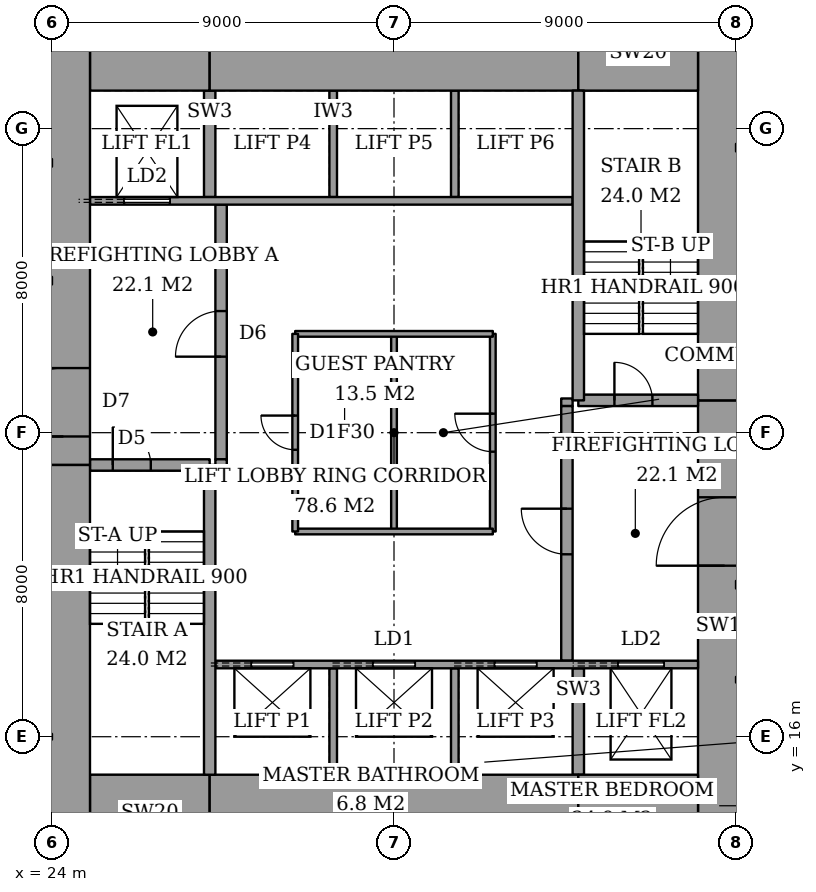
"""IFC4 building model, lengths in metres.
Left out: names, types, materials, properties, quantities, classifications, styles, units other than length and angle.
Written with IfcOpenShell. Run it as: python <this file> out.ifc"""

import sys

from ifc_helpers import new_model, si_unit, direction, frame, frame_2d, origin, place, context, subcontext, project, spatial, rectangle, extrude, element, fill, save


model = new_model("IFC4")
c1 = context("Model", 3, precision=1e-05, world=origin(), true_north=direction((0.0, 1.0)))
c2 = subcontext(c1, "Body", "Model", "MODEL_VIEW")
j1 = project(units=[si_unit("LENGTHUNIT", "METRE"), si_unit("PLANEANGLEUNIT", "RADIAN")], contexts=[c1])
p1 = place(None, origin())
s1 = spatial("IfcSite", under=j1, at=p1, CompositionType="ELEMENT")
p2 = place(p1, origin())
s2 = spatial("IfcBuilding", under=s1, at=p2, CompositionType="ELEMENT")
p3 = place(p2, frame((0.0, 0.0, 54.8)))
s3 = spatial("IfcBuildingStorey", under=s2, at=p3, CompositionType="ELEMENT", Elevation=54.8)
p4 = place(p3, frame((25.0, 14.0, 0.0), z_axis=(0.0, 0.0, 1.0), x_axis=(1.0, 0.0, 0.0)))
e1 = element("IfcWall", 1, at=p4, inside=s3, PredefinedType="SHEAR", context=c2, shape_type="SweptSolid", body=[
    extrude(rectangle(XDim=3.15, YDim=2.0, at=frame_2d((1.575, 0.0))), origin(), (0.0, 0.0, 1.0), 3.6),
])
p5 = place(p3, frame((28.15, 14.0, 0.0), z_axis=(0.0, 0.0, 1.0), x_axis=(1.0, 0.0, 0.0)))
e2 = element("IfcWall", 2, at=p5, inside=s3, PredefinedType="SHEAR", context=c2, shape_type="SweptSolid", body=[
    extrude(rectangle(XDim=9.7, YDim=2.0, at=frame_2d((4.85, 0.0))), origin(), (0.0, 0.0, 1.0), 3.6),
])
for number, where, z_axis, x_axis in (
    (3, (37.85, 14.0, 0.0), (0.0, 0.0, 1.0), (1.0, 0.0, 0.0)),
    (4, (25.0, 34.0, 0.0), (0.0, 0.0, 1.0), (1.0, 0.0, 0.0)),
):
    element("IfcWall", number, at=place(p3, frame(where, z_axis=z_axis, x_axis=x_axis)), inside=s3, PredefinedType="SHEAR", context=c2, shape_type="SweptSolid", body=[
        extrude(rectangle(XDim=3.15, YDim=2.0, at=frame_2d((1.575, 0.0))), origin(), (0.0, 0.0, 1.0), 3.6),
    ])
p6 = place(p3, frame((28.15, 34.0, 0.0), z_axis=(0.0, 0.0, 1.0), x_axis=(1.0, 0.0, 0.0)))
e5 = element("IfcWall", 5, at=p6, inside=s3, PredefinedType="SHEAR", context=c2, shape_type="SweptSolid", body=[
    extrude(rectangle(XDim=9.7, YDim=2.0, at=frame_2d((4.85, 0.0))), origin(), (0.0, 0.0, 1.0), 3.6),
])
p7 = place(p3, frame((37.85, 34.0, 0.0), z_axis=(0.0, 0.0, 1.0), x_axis=(1.0, 0.0, 0.0)))
e6 = element("IfcWall", 6, at=p7, inside=s3, PredefinedType="SHEAR", context=c2, shape_type="SweptSolid", body=[
    extrude(rectangle(XDim=3.15, YDim=2.0, at=frame_2d((1.575, 0.0))), origin(), (0.0, 0.0, 1.0), 3.6),
])
p8 = place(p3, frame((24.3, 13.0, 0.0), z_axis=(0.0, 0.0, 1.0), x_axis=(0.0, 1.0, 0.0)))
e7 = element("IfcWall", 7, at=p8, inside=s3, PredefinedType="SHEAR", context=c2, shape_type="SweptSolid", body=[
    extrude(rectangle(XDim=10.15, YDim=1.4, at=frame_2d((5.075, 0.0))), origin(), (0.0, 0.0, 1.0), 3.6),
])
p9 = place(p3, frame((24.3, 23.15, 0.0), z_axis=(0.0, 0.0, 1.0), x_axis=(0.0, 1.0, 0.0)))
e8 = element("IfcWall", 8, at=p9, inside=s3, PredefinedType="SHEAR", context=c2, shape_type="SweptSolid", body=[
    extrude(rectangle(XDim=11.85, YDim=1.4, at=frame_2d((5.925, 0.0))), origin(), (0.0, 0.0, 1.0), 3.6),
])
p10 = place(p9, frame((0.75, 0.0, 0.0)))
e9 = element("IfcOpeningElement", 9, at=p10, cuts=e8, PredefinedType="OPENING", context=c2, shape_type="SweptSolid", body=[
    extrude(rectangle(XDim=1.8, YDim=2.4, at=frame_2d((0.9, 1.2))), frame((0.0, 0.71, 0.0), z_axis=(0.0, -1.0, 0.0), x_axis=(1.0, 0.0, 0.0)), (0.0, 0.0, 1.0), 1.42),
])
p11 = place(p3, frame((41.7, 13.0, 0.0), z_axis=(0.0, 0.0, 1.0), x_axis=(0.0, 1.0, 0.0)))
e10 = element("IfcWall", 10, at=p11, inside=s3, PredefinedType="SHEAR", context=c2, shape_type="SweptSolid", body=[
    extrude(rectangle(XDim=11.85, YDim=1.4, at=frame_2d((5.925, 0.0))), origin(), (0.0, 0.0, 1.0), 3.6),
])
p12 = place(p11, frame((7.5, 0.0, 0.0)))
e11 = element("IfcOpeningElement", 11, at=p12, cuts=e10, PredefinedType="OPENING", context=c2, shape_type="SweptSolid", body=[
    extrude(rectangle(XDim=1.8, YDim=2.4, at=frame_2d((0.9, 1.2))), frame((0.0, 0.71, 0.0), z_axis=(0.0, -1.0, 0.0), x_axis=(1.0, 0.0, 0.0)), (0.0, 0.0, 1.0), 1.42),
])
p13 = place(p3, frame((41.7, 24.85, 0.0), z_axis=(0.0, 0.0, 1.0), x_axis=(0.0, 1.0, 0.0)))
e12 = element("IfcWall", 12, at=p13, inside=s3, PredefinedType="SHEAR", context=c2, shape_type="SweptSolid", body=[
    extrude(rectangle(XDim=10.15, YDim=1.4, at=frame_2d((5.075, 0.0))), origin(), (0.0, 0.0, 1.0), 3.6),
])
p14 = place(p3, frame((28.15, 15.0, 0.0), z_axis=(0.0, 0.0, 1.0), x_axis=(0.0, 1.0, 0.0)))
e13 = element("IfcWall", 13, at=p14, inside=s3, PredefinedType="SHEAR", context=c2, shape_type="SweptSolid", body=[
    extrude(rectangle(XDim=8.15, YDim=0.3, at=frame_2d((4.075, 0.0))), origin(), (0.0, 0.0, 1.0), 3.6),
])
p15 = place(p3, frame((25.0, 23.15, 0.0), z_axis=(0.0, 0.0, 1.0), x_axis=(1.0, 0.0, 0.0)))
e14 = element("IfcWall", 14, at=p15, inside=s3, PredefinedType="SHEAR", context=c2, shape_type="SweptSolid", body=[
    extrude(rectangle(XDim=3.15, YDim=0.3, at=frame_2d((1.575, 0.0))), origin(), (0.0, 0.0, 1.0), 3.6),
])
p16 = place(p15, frame((0.6, 0.0, 0.0)))
e15 = element("IfcOpeningElement", 15, at=p16, cuts=e14, PredefinedType="OPENING", context=c2, shape_type="SweptSolid", body=[
    extrude(rectangle(XDim=1.0, YDim=2.1, at=frame_2d((0.5, 1.05))), frame((0.0, 0.16, 0.0), z_axis=(0.0, -1.0, 0.0), x_axis=(1.0, 0.0, 0.0)), (0.0, 0.0, 1.0), 0.32),
])
p17 = place(p3, frame((37.85, 24.85, 0.0), z_axis=(0.0, 0.0, 1.0), x_axis=(0.0, 1.0, 0.0)))
e16 = element("IfcWall", 16, at=p17, inside=s3, PredefinedType="SHEAR", context=c2, shape_type="SweptSolid", body=[
    extrude(rectangle(XDim=8.15, YDim=0.3, at=frame_2d((4.075, 0.0))), origin(), (0.0, 0.0, 1.0), 3.6),
])
p18 = place(p3, frame((37.85, 24.85, 0.0), z_axis=(0.0, 0.0, 1.0), x_axis=(1.0, 0.0, 0.0)))
e17 = element("IfcWall", 17, at=p18, inside=s3, PredefinedType="SHEAR", context=c2, shape_type="SweptSolid", body=[
    extrude(rectangle(XDim=3.15, YDim=0.3, at=frame_2d((1.575, 0.0))), origin(), (0.0, 0.0, 1.0), 3.6),
])
p19 = place(p18, frame((0.95, 0.0, 0.0)))
e18 = element("IfcOpeningElement", 18, at=p19, cuts=e17, PredefinedType="OPENING", context=c2, shape_type="SweptSolid", body=[
    extrude(rectangle(XDim=1.0, YDim=2.1, at=frame_2d((0.5, 1.05))), frame((0.0, 0.16, 0.0), z_axis=(0.0, -1.0, 0.0), x_axis=(1.0, 0.0, 0.0)), (0.0, 0.0, 1.0), 0.32),
])
p20 = place(p3, frame((28.45, 23.3, 0.0), z_axis=(0.0, 0.0, 1.0), x_axis=(0.0, 1.0, 0.0)))
e19 = element("IfcWall", 19, at=p20, inside=s3, PredefinedType="PARTITIONING", context=c2, shape_type="SweptSolid", body=[
    extrude(rectangle(XDim=6.7, YDim=0.3, at=frame_2d((3.35, 0.0))), origin(), (0.0, 0.0, 1.0), 3.6),
])
p21 = place(p20, frame((2.7, 0.0, 0.0)))
e20 = element("IfcOpeningElement", 20, at=p21, cuts=e19, PredefinedType="OPENING", context=c2, shape_type="SweptSolid", body=[
    extrude(rectangle(XDim=1.2, YDim=2.1, at=frame_2d((0.6, 1.05))), frame((0.0, 0.16, 0.0), z_axis=(0.0, -1.0, 0.0), x_axis=(1.0, 0.0, 0.0)), (0.0, 0.0, 1.0), 0.32),
])
p22 = place(p3, frame((37.55, 18.0, 0.0), z_axis=(0.0, 0.0, 1.0), x_axis=(0.0, 1.0, 0.0)))
e21 = element("IfcWall", 21, at=p22, inside=s3, PredefinedType="PARTITIONING", context=c2, shape_type="SweptSolid", body=[
    extrude(rectangle(XDim=6.7, YDim=0.3, at=frame_2d((3.35, 0.0))), origin(), (0.0, 0.0, 1.0), 3.6),
])
p23 = place(p22, frame((2.8, 0.0, 0.0)))
e22 = element("IfcOpeningElement", 22, at=p23, cuts=e21, PredefinedType="OPENING", context=c2, shape_type="SweptSolid", body=[
    extrude(rectangle(XDim=1.2, YDim=2.1, at=frame_2d((0.6, 1.05))), frame((0.0, 0.16, 0.0), z_axis=(0.0, -1.0, 0.0), x_axis=(1.0, 0.0, 0.0)), (0.0, 0.0, 1.0), 0.32),
])
p24 = place(p3, frame((28.3, 17.9, 0.0), z_axis=(0.0, 0.0, 1.0), x_axis=(1.0, 0.0, 0.0)))
e23 = element("IfcWall", 23, at=p24, inside=s3, PredefinedType="PARTITIONING", context=c2, shape_type="SweptSolid", body=[
    extrude(rectangle(XDim=12.7, YDim=0.2, at=frame_2d((6.35, 0.0))), origin(), (0.0, 0.0, 1.0), 3.6),
])
p25 = place(p24, frame((0.95, 0.0, 0.0)))
e24 = element("IfcOpeningElement", 24, at=p25, cuts=e23, PredefinedType="OPENING", context=c2, shape_type="SweptSolid", body=[
    extrude(rectangle(XDim=1.1, YDim=2.1, at=frame_2d((0.55, 1.05))), frame((0.0, 0.11, 0.0), z_axis=(0.0, -1.0, 0.0), x_axis=(1.0, 0.0, 0.0)), (0.0, 0.0, 1.0), 0.22),
])
p26 = place(p24, frame((4.15, 0.0, 0.0)))
e25 = element("IfcOpeningElement", 25, at=p26, cuts=e23, PredefinedType="OPENING", context=c2, shape_type="SweptSolid", body=[
    extrude(rectangle(XDim=1.1, YDim=2.1, at=frame_2d((0.55, 1.05))), frame((0.0, 0.11, 0.0), z_axis=(0.0, -1.0, 0.0), x_axis=(1.0, 0.0, 0.0)), (0.0, 0.0, 1.0), 0.22),
])
p27 = place(p24, frame((7.35, 0.0, 0.0)))
e26 = element("IfcOpeningElement", 26, at=p27, cuts=e23, PredefinedType="OPENING", context=c2, shape_type="SweptSolid", body=[
    extrude(rectangle(XDim=1.1, YDim=2.1, at=frame_2d((0.55, 1.05))), frame((0.0, 0.11, 0.0), z_axis=(0.0, -1.0, 0.0), x_axis=(1.0, 0.0, 0.0)), (0.0, 0.0, 1.0), 0.22),
])
p28 = place(p24, frame((10.6, 0.0, 0.0)))
e27 = element("IfcOpeningElement", 27, at=p28, cuts=e23, PredefinedType="OPENING", context=c2, shape_type="SweptSolid", body=[
    extrude(rectangle(XDim=1.2, YDim=2.1, at=frame_2d((0.6, 1.05))), frame((0.0, 0.11, 0.0), z_axis=(0.0, -1.0, 0.0), x_axis=(1.0, 0.0, 0.0)), (0.0, 0.0, 1.0), 0.22),
])
p29 = place(p3, frame((25.0, 30.1, 0.0), z_axis=(0.0, 0.0, 1.0), x_axis=(1.0, 0.0, 0.0)))
e28 = element("IfcWall", 28, at=p29, inside=s3, PredefinedType="PARTITIONING", context=c2, shape_type="SweptSolid", body=[
    extrude(rectangle(XDim=12.7, YDim=0.2, at=frame_2d((6.35, 0.0))), origin(), (0.0, 0.0, 1.0), 3.6),
])
p30 = place(p29, frame((0.9, 0.0, 0.0)))
e29 = element("IfcOpeningElement", 29, at=p30, cuts=e28, PredefinedType="OPENING", context=c2, shape_type="SweptSolid", body=[
    extrude(rectangle(XDim=1.2, YDim=2.1, at=frame_2d((0.6, 1.05))), frame((0.0, 0.11, 0.0), z_axis=(0.0, -1.0, 0.0), x_axis=(1.0, 0.0, 0.0)), (0.0, 0.0, 1.0), 0.22),
])
for number, where, z_axis, x_axis in (
    (30, (31.4, 15.0, 0.0), (0.0, 0.0, 1.0), (0.0, 1.0, 0.0)),
    (31, (34.6, 15.0, 0.0), (0.0, 0.0, 1.0), (0.0, 1.0, 0.0)),
):
    element("IfcWall", number, at=place(p3, frame(where, z_axis=z_axis, x_axis=x_axis)), inside=s3, PredefinedType="PARTITIONING", context=c2, shape_type="SweptSolid", body=[
        extrude(rectangle(XDim=2.8, YDim=0.2, at=frame_2d((1.4, 0.0))), origin(), (0.0, 0.0, 1.0), 3.6),
    ])
p31 = place(p3, frame((37.85, 15.0, 0.0), z_axis=(0.0, 0.0, 1.0), x_axis=(0.0, 1.0, 0.0)))
e32 = element("IfcWall", 32, at=p31, inside=s3, PredefinedType="SHEAR", context=c2, shape_type="SweptSolid", body=[
    extrude(rectangle(XDim=2.8, YDim=0.3, at=frame_2d((1.4, 0.0))), origin(), (0.0, 0.0, 1.0), 3.6),
])
for number, where, z_axis, x_axis in (
    (33, (31.4, 30.2, 0.0), (0.0, 0.0, 1.0), (0.0, 1.0, 0.0)),
    (34, (34.6, 30.2, 0.0), (0.0, 0.0, 1.0), (0.0, 1.0, 0.0)),
):
    element("IfcWall", number, at=place(p3, frame(where, z_axis=z_axis, x_axis=x_axis)), inside=s3, PredefinedType="PARTITIONING", context=c2, shape_type="SweptSolid", body=[
        extrude(rectangle(XDim=2.8, YDim=0.2, at=frame_2d((1.4, 0.0))), origin(), (0.0, 0.0, 1.0), 3.6),
    ])
p32 = place(p3, frame((28.15, 30.2, 0.0), z_axis=(0.0, 0.0, 1.0), x_axis=(0.0, 1.0, 0.0)))
e35 = element("IfcWall", 35, at=p32, inside=s3, PredefinedType="SHEAR", context=c2, shape_type="SweptSolid", body=[
    extrude(rectangle(XDim=2.8, YDim=0.3, at=frame_2d((1.4, 0.0))), origin(), (0.0, 0.0, 1.0), 3.6),
])
for number, where, z_axis, x_axis in (
    (36, (28.3, 23.2, 0.0), (0.0, 0.0, 1.0), (1.0, 0.0, 0.0)),
    (37, (37.4, 24.8, 0.0), (0.0, 0.0, 1.0), (1.0, 0.0, 0.0)),
):
    element("IfcWall", number, at=place(p3, frame(where, z_axis=z_axis, x_axis=x_axis)), inside=s3, PredefinedType="PARTITIONING", context=c2, shape_type="SweptSolid", body=[
        extrude(rectangle(XDim=0.3, YDim=0.2, at=frame_2d((0.15, 0.0))), origin(), (0.0, 0.0, 1.0), 3.6),
    ])
for number, where, z_axis, x_axis in (
    (38, (30.4, 21.4, 0.0), (0.0, 0.0, 1.0), (1.0, 0.0, 0.0)),
    (39, (30.4, 26.6, 0.0), (0.0, 0.0, 1.0), (1.0, 0.0, 0.0)),
):
    element("IfcWall", number, at=place(p3, frame(where, z_axis=z_axis, x_axis=x_axis)), inside=s3, PredefinedType="PARTITIONING", context=c2, shape_type="SweptSolid", body=[
        extrude(rectangle(XDim=5.2, YDim=0.15, at=frame_2d((2.6, 0.0))), origin(), (0.0, 0.0, 1.0), 3.35),
    ])
p33 = place(p3, frame((30.4, 21.4, 0.0), z_axis=(0.0, 0.0, 1.0), x_axis=(0.0, 1.0, 0.0)))
e40 = element("IfcWall", 40, at=p33, inside=s3, PredefinedType="PARTITIONING", context=c2, shape_type="SweptSolid", body=[
    extrude(rectangle(XDim=5.2, YDim=0.15, at=frame_2d((2.6, 0.0))), origin(), (0.0, 0.0, 1.0), 3.35),
])
p34 = place(p33, frame((2.15, 0.0, 0.0)))
e41 = element("IfcOpeningElement", 41, at=p34, cuts=e40, PredefinedType="OPENING", context=c2, shape_type="SweptSolid", body=[
    extrude(rectangle(XDim=0.9, YDim=2.1, at=frame_2d((0.45, 1.05))), frame((0.0, 0.085, 0.0), z_axis=(0.0, -1.0, 0.0), x_axis=(1.0, 0.0, 0.0)), (0.0, 0.0, 1.0), 0.17),
])
p35 = place(p3, frame((35.6, 21.4, 0.0), z_axis=(0.0, 0.0, 1.0), x_axis=(0.0, 1.0, 0.0)))
e42 = element("IfcWall", 42, at=p35, inside=s3, PredefinedType="PARTITIONING", context=c2, shape_type="SweptSolid", body=[
    extrude(rectangle(XDim=5.2, YDim=0.15, at=frame_2d((2.6, 0.0))), origin(), (0.0, 0.0, 1.0), 3.35),
])
p36 = place(p35, frame((2.1, 0.0, 0.0)))
e43 = element("IfcOpeningElement", 43, at=p36, cuts=e42, PredefinedType="OPENING", context=c2, shape_type="SweptSolid", body=[
    extrude(rectangle(XDim=1.0, YDim=2.1, at=frame_2d((0.5, 1.05))), frame((0.0, 0.085, 0.0), z_axis=(0.0, -1.0, 0.0), x_axis=(1.0, 0.0, 0.0)), (0.0, 0.0, 1.0), 0.17),
])
p37 = place(p3, frame((33.0, 21.4, 0.0), z_axis=(0.0, 0.0, 1.0), x_axis=(0.0, 1.0, 0.0)))
e44 = element("IfcWall", 44, at=p37, inside=s3, PredefinedType="PARTITIONING", context=c2, shape_type="SweptSolid", body=[
    extrude(rectangle(XDim=5.2, YDim=0.15, at=frame_2d((2.6, 0.0))), origin(), (0.0, 0.0, 1.0), 3.35),
])
p38 = place(p16, origin())
e45 = element("IfcDoor", 45, at=p38, inside=s3, OperationType="SINGLE_SWING_RIGHT", PredefinedType="DOOR", context=c2, shape_type="SweptSolid", body=[
    extrude(rectangle(XDim=1.0, YDim=2.1, at=frame_2d((0.5, 1.05))), frame((0.0, 0.025, 0.0), z_axis=(0.0, -1.0, 0.0), x_axis=(1.0, 0.0, 0.0)), (0.0, 0.0, 1.0), 0.05),
])
fill(e15, e45)
p39 = place(p19, origin())
e46 = element("IfcDoor", 46, at=p39, inside=s3, OperationType="SINGLE_SWING_RIGHT", PredefinedType="DOOR", context=c2, shape_type="SweptSolid", body=[
    extrude(rectangle(XDim=1.0, YDim=2.1, at=frame_2d((0.5, 1.05))), frame((0.0, 0.025, 0.0), z_axis=(0.0, -1.0, 0.0), x_axis=(1.0, 0.0, 0.0)), (0.0, 0.0, 1.0), 0.05),
])
fill(e18, e46)
p40 = place(p21, origin())
e47 = element("IfcDoor", 47, at=p40, inside=s3, OperationType="SINGLE_SWING_RIGHT", PredefinedType="DOOR", context=c2, shape_type="SweptSolid", body=[
    extrude(rectangle(XDim=1.2, YDim=2.1, at=frame_2d((0.6, 1.05))), frame((0.0, 0.025, 0.0), z_axis=(0.0, -1.0, 0.0), x_axis=(1.0, 0.0, 0.0)), (0.0, 0.0, 1.0), 0.05),
])
fill(e20, e47)
p41 = place(p23, origin())
e48 = element("IfcDoor", 48, at=p41, inside=s3, OperationType="SINGLE_SWING_LEFT", PredefinedType="DOOR", context=c2, shape_type="SweptSolid", body=[
    extrude(rectangle(XDim=1.2, YDim=2.1, at=frame_2d((0.6, 1.05))), frame((0.0, 0.025, 0.0), z_axis=(0.0, -1.0, 0.0), x_axis=(1.0, 0.0, 0.0)), (0.0, 0.0, 1.0), 0.05),
])
fill(e22, e48)
p42 = place(p10, origin())
e49 = element("IfcDoor", 49, at=p42, inside=s3, OperationType="DOUBLE_DOOR_DOUBLE_SWING", PredefinedType="DOOR", context=c2, shape_type="SweptSolid", body=[
    extrude(rectangle(XDim=1.8, YDim=2.4, at=frame_2d((0.9, 1.2))), frame((0.0, 0.025, 0.0), z_axis=(0.0, -1.0, 0.0), x_axis=(1.0, 0.0, 0.0)), (0.0, 0.0, 1.0), 0.05),
])
fill(e9, e49)
p43 = place(p12, origin())
e50 = element("IfcDoor", 50, at=p43, inside=s3, OperationType="DOUBLE_DOOR_DOUBLE_SWING", PredefinedType="DOOR", context=c2, shape_type="SweptSolid", body=[
    extrude(rectangle(XDim=1.8, YDim=2.4, at=frame_2d((0.9, 1.2))), frame((0.0, 0.025, 0.0), z_axis=(0.0, -1.0, 0.0), x_axis=(1.0, 0.0, 0.0)), (0.0, 0.0, 1.0), 0.05),
])
fill(e11, e50)
p44 = place(p34, origin())
e51 = element("IfcDoor", 51, at=p44, inside=s3, OperationType="SINGLE_SWING_LEFT", PredefinedType="DOOR", context=c2, shape_type="SweptSolid", body=[
    extrude(rectangle(XDim=0.9, YDim=2.1, at=frame_2d((0.45, 1.05))), frame((0.0, 0.025, 0.0), z_axis=(0.0, -1.0, 0.0), x_axis=(1.0, 0.0, 0.0)), (0.0, 0.0, 1.0), 0.05),
])
fill(e41, e51)
p45 = place(p36, origin())
e52 = element("IfcDoor", 52, at=p45, inside=s3, OperationType="SINGLE_SWING_LEFT", PredefinedType="DOOR", context=c2, shape_type="SweptSolid", body=[
    extrude(rectangle(XDim=1.0, YDim=2.1, at=frame_2d((0.5, 1.05))), frame((0.0, 0.025, 0.0), z_axis=(0.0, -1.0, 0.0), x_axis=(1.0, 0.0, 0.0)), (0.0, 0.0, 1.0), 0.05),
])
fill(e43, e52)
p46 = place(p25, origin())
e53 = element("IfcDoor", 53, at=p46, inside=s3, OperationType="SLIDING_TO_LEFT", PredefinedType="DOOR", context=c2, shape_type="SweptSolid", body=[
    extrude(rectangle(XDim=1.1, YDim=2.1, at=frame_2d((0.55, 1.05))), frame((0.0, 0.025, 0.0), z_axis=(0.0, -1.0, 0.0), x_axis=(1.0, 0.0, 0.0)), (0.0, 0.0, 1.0), 0.05),
])
fill(e24, e53)
p47 = place(p26, origin())
e54 = element("IfcDoor", 54, at=p47, inside=s3, OperationType="SLIDING_TO_LEFT", PredefinedType="DOOR", context=c2, shape_type="SweptSolid", body=[
    extrude(rectangle(XDim=1.1, YDim=2.1, at=frame_2d((0.55, 1.05))), frame((0.0, 0.025, 0.0), z_axis=(0.0, -1.0, 0.0), x_axis=(1.0, 0.0, 0.0)), (0.0, 0.0, 1.0), 0.05),
])
fill(e25, e54)
p48 = place(p27, origin())
e55 = element("IfcDoor", 55, at=p48, inside=s3, OperationType="SLIDING_TO_LEFT", PredefinedType="DOOR", context=c2, shape_type="SweptSolid", body=[
    extrude(rectangle(XDim=1.1, YDim=2.1, at=frame_2d((0.55, 1.05))), frame((0.0, 0.025, 0.0), z_axis=(0.0, -1.0, 0.0), x_axis=(1.0, 0.0, 0.0)), (0.0, 0.0, 1.0), 0.05),
])
fill(e26, e55)
p49 = place(p30, origin())
e56 = element("IfcDoor", 56, at=p49, inside=s3, OperationType="SLIDING_TO_LEFT", PredefinedType="DOOR", context=c2, shape_type="SweptSolid", body=[
    extrude(rectangle(XDim=1.2, YDim=2.1, at=frame_2d((0.6, 1.05))), frame((0.0, 0.025, 0.0), z_axis=(0.0, -1.0, 0.0), x_axis=(1.0, 0.0, 0.0)), (0.0, 0.0, 1.0), 0.05),
])
fill(e29, e56)
p50 = place(p28, origin())
e57 = element("IfcDoor", 57, at=p50, inside=s3, OperationType="SLIDING_TO_LEFT", PredefinedType="DOOR", context=c2, shape_type="SweptSolid", body=[
    extrude(rectangle(XDim=1.2, YDim=2.1, at=frame_2d((0.6, 1.05))), frame((0.0, 0.025, 0.0), z_axis=(0.0, -1.0, 0.0), x_axis=(1.0, 0.0, 0.0)), (0.0, 0.0, 1.0), 0.05),
])
fill(e27, e57)
save(model, sys.argv[1])
